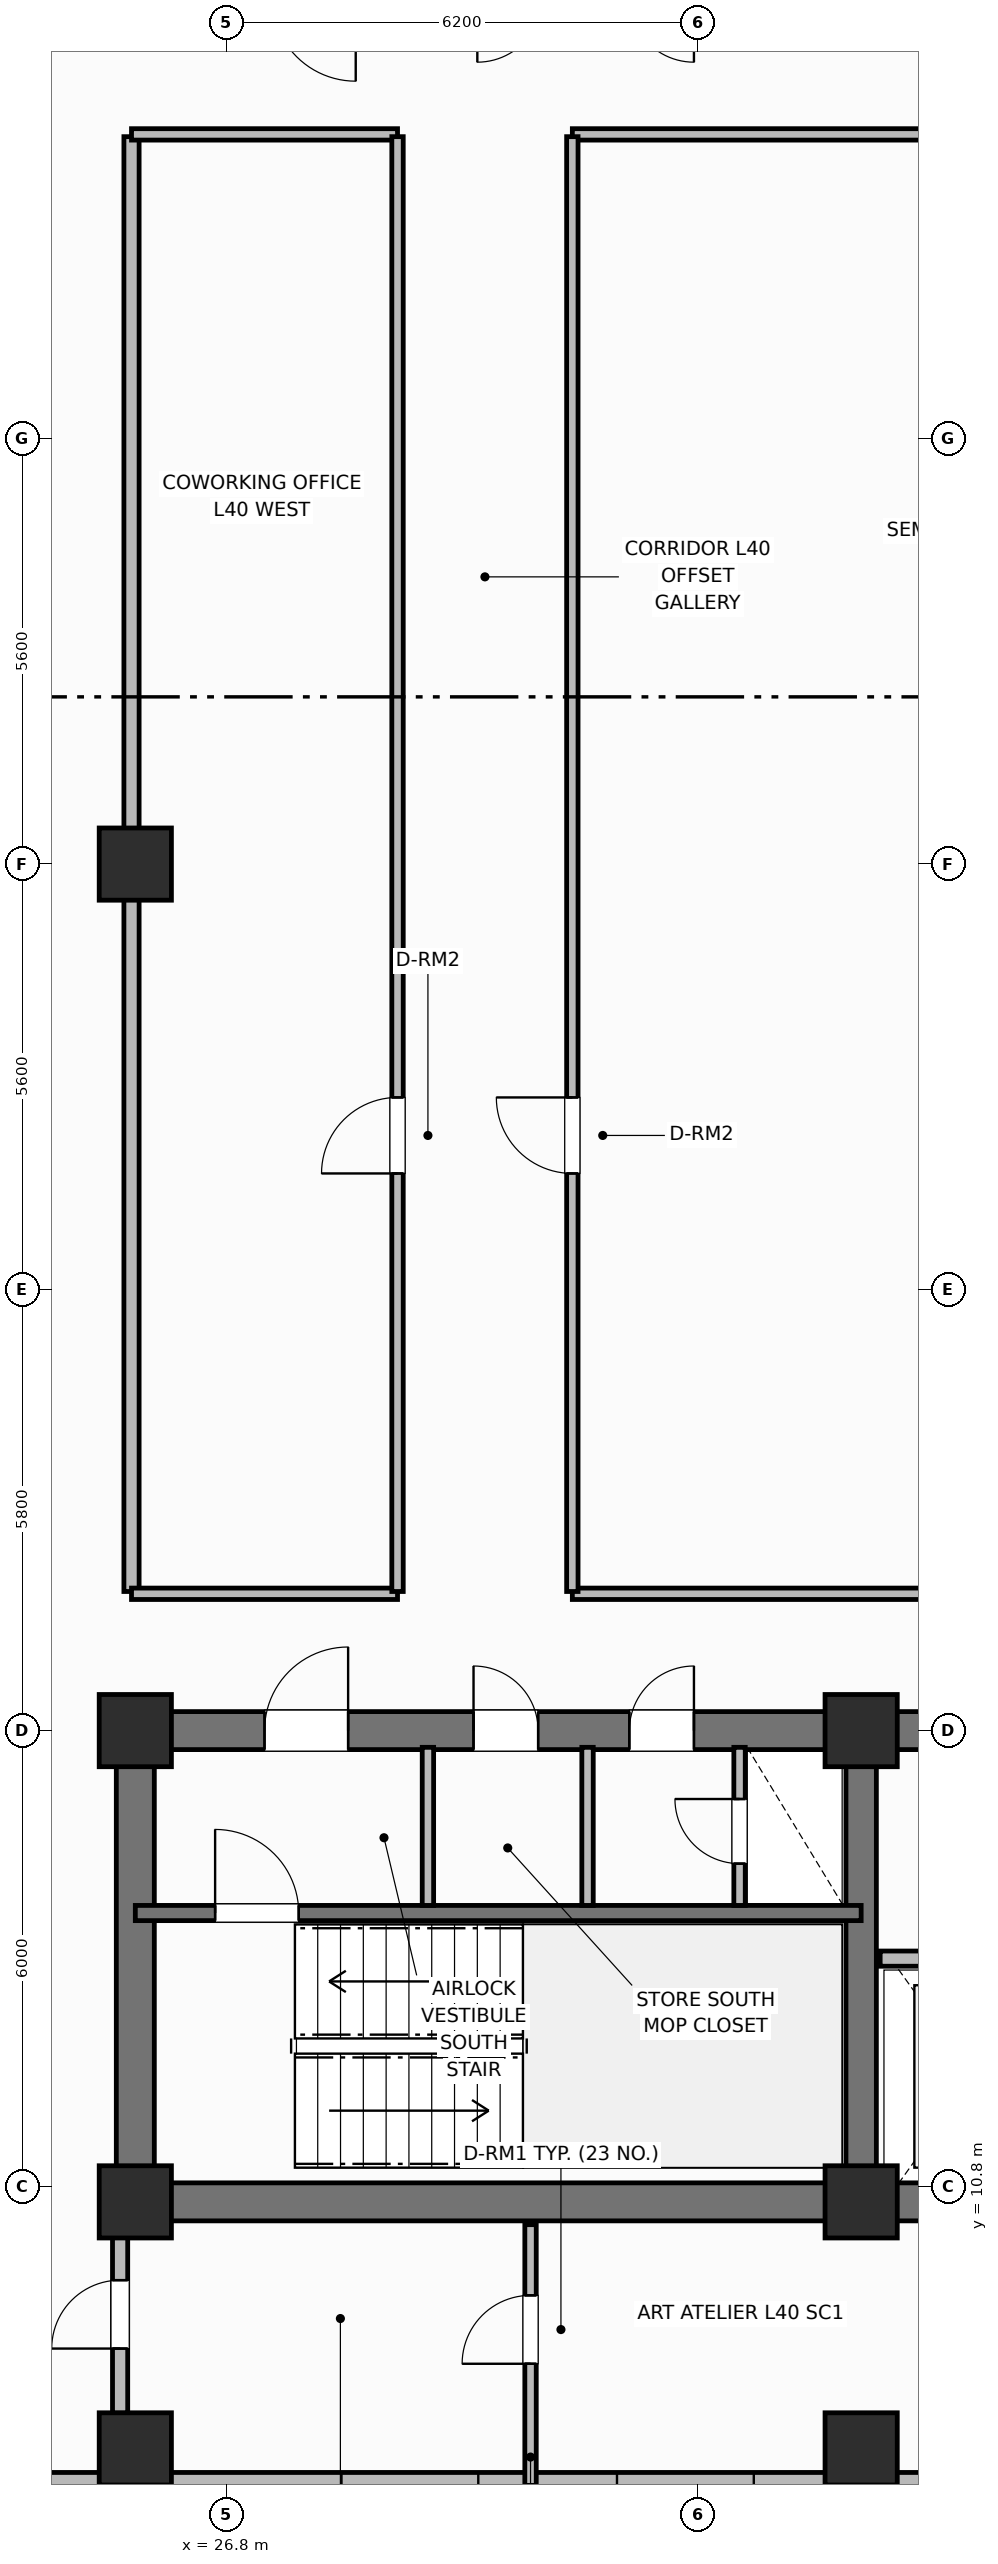
"""IFC4 building model, lengths in metres.
Left out: names, types, materials, properties, quantities, classifications, styles, units other than length and angle.
Written with IfcOpenShell. Run it as: python <this file> out.ifc"""

import sys

from ifc_helpers import new_model, si_unit, direction, frame, frame_2d, origin, origin_2d, place, context, subcontext, project, spatial, rectangle, extrude, element, fill, save


model = new_model("IFC4")
c1 = context("Model", 3, precision=1e-05, world=origin(), true_north=direction((0.0, 1.0)))
c2 = subcontext(c1, "Body", "Model", "MODEL_VIEW")
j1 = project(units=[si_unit("LENGTHUNIT", "METRE"), si_unit("PLANEANGLEUNIT", "RADIAN")], contexts=[c1])
p1 = place(None, origin())
s1 = spatial("IfcSite", under=j1, at=p1, CompositionType="ELEMENT")
p2 = place(p1, origin())
s2 = spatial("IfcBuilding", under=s1, at=p2, CompositionType="ELEMENT")
p3 = place(p2, frame((0.0, 0.0, 162.6)))
s3 = spatial("IfcBuildingStorey", under=s2, at=p3, CompositionType="ELEMENT", Elevation=162.6)
p4 = place(p3, frame((52.8, 10.6, 0.0), z_axis=(0.0, 0.0, 1.0), x_axis=(-1.0, 0.0, 0.0)))
e1 = element("IfcWall", 1, at=p4, inside=s3, PredefinedType="SHEAR", context=c2, shape_type="SweptSolid", body=[
    extrude(rectangle(XDim=27.2, YDim=0.5, at=frame_2d((13.6, 0.0))), origin(), (0.0, 0.0, 1.0), 3.7),
])
p5 = place(p3, frame((25.6, 10.85, 0.0), z_axis=(0.0, 0.0, 1.0), x_axis=(0.0, 1.0, 0.0)))
e2 = element("IfcWall", 2, at=p5, inside=s3, PredefinedType="SHEAR", context=c2, shape_type="SweptSolid", body=[
    extrude(rectangle(XDim=5.7, YDim=0.5, at=frame_2d((2.85, 0.0))), origin(), (0.0, 0.0, 1.0), 3.7),
])
p6 = place(p3, frame((25.6, 16.8, 0.0), z_axis=(0.0, 0.0, 1.0), x_axis=(1.0, 0.0, 0.0)))
e3 = element("IfcWall", 3, at=p6, inside=s3, PredefinedType="SHEAR", context=c2, shape_type="SweptSolid", body=[
    extrude(rectangle(XDim=27.2, YDim=0.5, at=frame_2d((13.6, 0.0))), origin(), (0.0, 0.0, 1.0), 3.7),
])
p7 = place(p6, frame((1.7, 0.0, 0.0)))
e4 = element("IfcOpeningElement", 4, at=p7, cuts=e3, PredefinedType="OPENING", context=c2, shape_type="SweptSolid", body=[
    extrude(rectangle(XDim=1.1, YDim=2.15, at=frame_2d((0.55, 1.075))), frame((0.0, 0.26, 0.0), z_axis=(0.0, -1.0, 0.0), x_axis=(1.0, 0.0, 0.0)), (0.0, 0.0, 1.0), 0.52),
])
p8 = place(p6, frame((4.45, 0.0, 0.0)))
e5 = element("IfcOpeningElement", 5, at=p8, cuts=e3, PredefinedType="OPENING", context=c2, shape_type="SweptSolid", body=[
    extrude(rectangle(XDim=0.85, YDim=2.1, at=frame_2d((0.425, 1.05))), frame((0.0, 0.26, 0.0), z_axis=(0.0, -1.0, 0.0), x_axis=(1.0, 0.0, 0.0)), (0.0, 0.0, 1.0), 0.52),
])
p9 = place(p6, frame((6.5, 0.0, 0.0)))
e6 = element("IfcOpeningElement", 6, at=p9, cuts=e3, PredefinedType="OPENING", context=c2, shape_type="SweptSolid", body=[
    extrude(rectangle(XDim=0.85, YDim=2.1, at=frame_2d((0.425, 1.05))), frame((0.0, 0.26, 0.0), z_axis=(0.0, -1.0, 0.0), x_axis=(1.0, 0.0, 0.0)), (0.0, 0.0, 1.0), 0.52),
])
p10 = place(p6, frame((13.0, 0.0, 0.0)))
e7 = element("IfcOpeningElement", 7, at=p10, cuts=e3, PredefinedType="OPENING", context=c2, shape_type="SweptSolid", body=[
    extrude(rectangle(XDim=1.2, YDim=2.15, at=frame_2d((0.6, 1.075))), frame((0.0, 0.26, 0.0), z_axis=(0.0, -1.0, 0.0), x_axis=(1.0, 0.0, 0.0)), (0.0, 0.0, 1.0), 0.52),
])
p11 = place(p6, frame((19.8, 0.0, 0.0)))
e8 = element("IfcOpeningElement", 8, at=p11, cuts=e3, PredefinedType="OPENING", context=c2, shape_type="SweptSolid", body=[
    extrude(rectangle(XDim=0.85, YDim=2.1, at=frame_2d((0.425, 1.05))), frame((0.0, 0.26, 0.0), z_axis=(0.0, -1.0, 0.0), x_axis=(1.0, 0.0, 0.0)), (0.0, 0.0, 1.0), 0.52),
])
p12 = place(p6, frame((24.2, 0.0, 0.0)))
e9 = element("IfcOpeningElement", 9, at=p12, cuts=e3, PredefinedType="OPENING", context=c2, shape_type="SweptSolid", body=[
    extrude(rectangle(XDim=0.85, YDim=2.1, at=frame_2d((0.425, 1.05))), frame((0.0, 0.26, 0.0), z_axis=(0.0, -1.0, 0.0), x_axis=(1.0, 0.0, 0.0)), (0.0, 0.0, 1.0), 0.52),
])
p13 = place(p3, frame((35.15, 10.85, 0.0), z_axis=(0.0, 0.0, 1.0), x_axis=(0.0, 1.0, 0.0)))
e10 = element("IfcWall", 10, at=p13, inside=s3, PredefinedType="SHEAR", context=c2, shape_type="SweptSolid", body=[
    extrude(rectangle(XDim=5.7, YDim=0.4, at=frame_2d((2.85, 0.0))), origin(), (0.0, 0.0, 1.0), 3.7),
])
for number, where, z_axis, x_axis in (
    (11, (25.6, 10.6, 0.0), (0.0, 0.0, 1.0), (1.0, 0.0, 0.0)),
    (12, (25.6, 16.8, 0.0), (0.0, 0.0, 1.0), (1.0, 0.0, 0.0)),
    (13, (35.15, 10.6, 0.0), (0.0, 0.0, 1.0), (1.0, 0.0, 0.0)),
    (14, (35.15, 16.8, 0.0), (0.0, 0.0, 1.0), (1.0, 0.0, 0.0)),
    (15, (25.6, 28.2, 0.0), (0.0, 0.0, 1.0), (1.0, 0.0, 0.0)),
    (16, (25.6, 7.35, 0.0), (0.0, 0.0, 1.0), (1.0, 0.0, 0.0)),
    (17, (35.15, 7.35, 0.0), (0.0, 0.0, 1.0), (1.0, 0.0, 0.0)),
):
    element("IfcColumn", number, at=place(p3, frame(where, z_axis=z_axis, x_axis=x_axis)), inside=s3, PredefinedType="COLUMN", context=c2, shape_type="SweptSolid", body=[
        extrude(rectangle(XDim=0.95, YDim=0.95, at=origin_2d()), origin(), (0.0, 0.0, 1.0), 3.7),
    ])
p14 = place(p3, frame((20.2, 6.87, 0.0), z_axis=(0.0, 0.0, 1.0), x_axis=(1.0, 0.0, 0.0)))
e18 = element("IfcWall", 18, at=p14, inside=s3, PredefinedType="SOLIDWALL", context=c2, shape_type="SweptSolid", body=[
    extrude(rectangle(XDim=15.8, YDim=0.34, at=frame_2d((7.9, 0.0))), origin(), (0.0, 0.0, 1.0), 2.72),
])
p15 = place(p14, frame((0.863, 0.0, 0.75)))
e19 = element("IfcOpeningElement", 19, at=p15, cuts=e18, PredefinedType="OPENING", context=c2, shape_type="SweptSolid", body=[
    extrude(rectangle(XDim=1.8, YDim=1.85, at=frame_2d((0.9, 0.925))), frame((0.0, 0.18, 0.0), z_axis=(0.0, -1.0, 0.0), x_axis=(1.0, 0.0, 0.0)), (0.0, 0.0, 1.0), 0.36),
])
p16 = place(p14, frame((8.113, 0.0, 0.75)))
e20 = element("IfcOpeningElement", 20, at=p16, cuts=e18, PredefinedType="OPENING", context=c2, shape_type="SweptSolid", body=[
    extrude(rectangle(XDim=1.8, YDim=1.85, at=frame_2d((0.9, 0.925))), frame((0.0, 0.18, 0.0), z_axis=(0.0, -1.0, 0.0), x_axis=(1.0, 0.0, 0.0)), (0.0, 0.0, 1.0), 0.36),
])
p17 = place(p14, frame((11.738, 0.0, 0.75)))
e21 = element("IfcOpeningElement", 21, at=p17, cuts=e18, PredefinedType="OPENING", context=c2, shape_type="SweptSolid", body=[
    extrude(rectangle(XDim=1.8, YDim=1.85, at=frame_2d((0.9, 0.925))), frame((0.0, 0.18, 0.0), z_axis=(0.0, -1.0, 0.0), x_axis=(1.0, 0.0, 0.0)), (0.0, 0.0, 1.0), 0.36),
])
p18 = place(p3, frame((25.6, 14.4, 0.0), z_axis=(0.0, 0.0, 1.0), x_axis=(1.0, 0.0, 0.0)))
e22 = element("IfcWall", 22, at=p18, inside=s3, PredefinedType="SHEAR", context=c2, shape_type="SweptSolid", body=[
    extrude(rectangle(XDim=9.55, YDim=0.2, at=frame_2d((4.775, 0.0))), origin(), (0.0, 0.0, 1.0), 3.7),
])
p19 = place(p18, frame((1.05, 0.0, 0.0)))
e23 = element("IfcOpeningElement", 23, at=p19, cuts=e22, PredefinedType="OPENING", context=c2, shape_type="SweptSolid", body=[
    extrude(rectangle(XDim=1.1, YDim=2.15, at=frame_2d((0.55, 1.075))), frame((0.0, 0.11, 0.0), z_axis=(0.0, -1.0, 0.0), x_axis=(1.0, 0.0, 0.0)), (0.0, 0.0, 1.0), 0.22),
])
for number, where, z_axis, x_axis in (
    (24, (29.45, 14.5, 0.0), (0.0, 0.0, 1.0), (0.0, 1.0, 0.0)),
    (25, (31.55, 14.5, 0.0), (0.0, 0.0, 1.0), (0.0, 1.0, 0.0)),
):
    element("IfcWall", number, at=place(p3, frame(where, z_axis=z_axis, x_axis=x_axis)), inside=s3, PredefinedType="PARTITIONING", context=c2, shape_type="SweptSolid", body=[
        extrude(rectangle(XDim=2.08, YDim=0.15, at=frame_2d((1.04, 0.0))), origin(), (0.0, 0.0, 1.0), 2.55),
    ])
p20 = place(p3, frame((33.55, 14.5, 0.0), z_axis=(0.0, 0.0, 1.0), x_axis=(0.0, 1.0, 0.0)))
e26 = element("IfcWall", 26, at=p20, inside=s3, PredefinedType="PARTITIONING", context=c2, shape_type="SweptSolid", body=[
    extrude(rectangle(XDim=2.08, YDim=0.15, at=frame_2d((1.04, 0.0))), origin(), (0.0, 0.0, 1.0), 2.55),
])
p21 = place(p20, frame((0.55, 0.0, 0.0)))
e27 = element("IfcOpeningElement", 27, at=p21, cuts=e26, PredefinedType="OPENING", context=c2, shape_type="SweptSolid", body=[
    extrude(rectangle(XDim=0.85, YDim=2.05, at=frame_2d((0.425, 1.025))), frame((0.0, 0.085, 0.0), z_axis=(0.0, -1.0, 0.0), x_axis=(1.0, 0.0, 0.0)), (0.0, 0.0, 1.0), 0.17),
])
p22 = place(p3, frame((35.4, 13.8, 0.0), z_axis=(0.0, 0.0, 1.0), x_axis=(1.0, 0.0, 0.0)))
e28 = element("IfcWall", 28, at=p22, inside=s3, PredefinedType="PARTITIONING", context=c2, shape_type="SweptSolid", body=[
    extrude(rectangle(XDim=7.6, YDim=0.2, at=frame_2d((3.8, 0.0))), origin(), (0.0, 0.0, 1.0), 2.32),
])
p23 = place(p22, frame((0.7, 0.0, 0.0)))
e29 = element("IfcOpeningElement", 29, at=p23, cuts=e28, PredefinedType="OPENING", context=c2, shape_type="SweptSolid", body=[
    extrude(rectangle(XDim=1.1, YDim=2.15, at=frame_2d((0.55, 1.075))), frame((0.0, 0.11, 0.0), z_axis=(0.0, -1.0, 0.0), x_axis=(1.0, 0.0, 0.0)), (0.0, 0.0, 1.0), 0.22),
])
p24 = place(p22, frame((3.35, 0.0, 0.0)))
e30 = element("IfcOpeningElement", 30, at=p24, cuts=e28, PredefinedType="OPENING", context=c2, shape_type="SweptSolid", body=[
    extrude(rectangle(XDim=1.2, YDim=2.15, at=frame_2d((0.6, 1.075))), frame((0.0, 0.11, 0.0), z_axis=(0.0, -1.0, 0.0), x_axis=(1.0, 0.0, 0.0)), (0.0, 0.0, 1.0), 0.22),
])
p25 = place(p3, frame((25.55, 18.63, 0.0), z_axis=(0.0, 0.0, 1.0), x_axis=(0.0, 1.0, 0.0)))
e31 = element("IfcWall", 31, at=p25, inside=s3, PredefinedType="PARTITIONING", context=c2, shape_type="SweptSolid", body=[
    extrude(rectangle(XDim=19.14, YDim=0.2, at=frame_2d((9.57, 0.0))), origin(), (0.0, 0.0, 1.0), 2.55),
])
p26 = place(p3, frame((25.55, 18.6, 0.0), z_axis=(0.0, 0.0, 1.0), x_axis=(1.0, 0.0, 0.0)))
e32 = element("IfcWall", 32, at=p26, inside=s3, PredefinedType="PARTITIONING", context=c2, shape_type="SweptSolid", body=[
    extrude(rectangle(XDim=3.5, YDim=0.15, at=frame_2d((1.75, 0.0))), origin(), (0.0, 0.0, 1.0), 2.55),
])
p27 = place(p3, frame((31.35, 18.6, 0.0), z_axis=(0.0, 0.0, 1.0), x_axis=(1.0, 0.0, 0.0)))
e33 = element("IfcWall", 33, at=p27, inside=s3, PredefinedType="PARTITIONING", context=c2, shape_type="SweptSolid", body=[
    extrude(rectangle(XDim=21.5, YDim=0.15, at=frame_2d((10.75, 0.0))), origin(), (0.0, 0.0, 1.0), 2.55),
])
p28 = place(p3, frame((25.55, 37.8, 0.0), z_axis=(0.0, 0.0, 1.0), x_axis=(1.0, 0.0, 0.0)))
e34 = element("IfcWall", 34, at=p28, inside=s3, PredefinedType="PARTITIONING", context=c2, shape_type="SweptSolid", body=[
    extrude(rectangle(XDim=3.5, YDim=0.15, at=frame_2d((1.75, 0.0))), origin(), (0.0, 0.0, 1.0), 2.55),
])
p29 = place(p3, frame((31.35, 37.8, 0.0), z_axis=(0.0, 0.0, 1.0), x_axis=(1.0, 0.0, 0.0)))
e35 = element("IfcWall", 35, at=p29, inside=s3, PredefinedType="PARTITIONING", context=c2, shape_type="SweptSolid", body=[
    extrude(rectangle(XDim=21.5, YDim=0.15, at=frame_2d((10.75, 0.0))), origin(), (0.0, 0.0, 1.0), 2.55),
])
p30 = place(p3, frame((29.05, 18.63, 0.0), z_axis=(0.0, 0.0, 1.0), x_axis=(0.0, 1.0, 0.0)))
e36 = element("IfcWall", 36, at=p30, inside=s3, PredefinedType="PARTITIONING", context=c2, shape_type="SweptSolid", body=[
    extrude(rectangle(XDim=19.14, YDim=0.15, at=frame_2d((9.57, 0.0))), origin(), (0.0, 0.0, 1.0), 2.55),
])
p31 = place(p30, frame((5.5, 0.0, 0.0)))
e37 = element("IfcOpeningElement", 37, at=p31, cuts=e36, PredefinedType="OPENING", context=c2, shape_type="SweptSolid", body=[
    extrude(rectangle(XDim=1.0, YDim=2.15, at=frame_2d((0.5, 1.075))), frame((0.0, 0.085, 0.0), z_axis=(0.0, -1.0, 0.0), x_axis=(1.0, 0.0, 0.0)), (0.0, 0.0, 1.0), 0.17),
])
p32 = place(p3, frame((31.35, 18.63, 0.0), z_axis=(0.0, 0.0, 1.0), x_axis=(0.0, 1.0, 0.0)))
e38 = element("IfcWall", 38, at=p32, inside=s3, PredefinedType="PARTITIONING", context=c2, shape_type="SweptSolid", body=[
    extrude(rectangle(XDim=19.14, YDim=0.15, at=frame_2d((9.57, 0.0))), origin(), (0.0, 0.0, 1.0), 2.55),
])
p33 = place(p32, frame((5.5, 0.0, 0.0)))
e39 = element("IfcOpeningElement", 39, at=p33, cuts=e38, PredefinedType="OPENING", context=c2, shape_type="SweptSolid", body=[
    extrude(rectangle(XDim=1.0, YDim=2.15, at=frame_2d((0.5, 1.075))), frame((0.0, 0.085, 0.0), z_axis=(0.0, -1.0, 0.0), x_axis=(1.0, 0.0, 0.0)), (0.0, 0.0, 1.0), 0.17),
])
p34 = place(p3, frame((30.8, 6.87, 0.0), z_axis=(0.0, 0.0, 1.0), x_axis=(0.0, 1.0, 0.0)))
e40 = element("IfcWall", 40, at=p34, inside=s3, PredefinedType="PARTITIONING", context=c2, shape_type="SweptSolid", body=[
    extrude(rectangle(XDim=3.43, YDim=0.15, at=frame_2d((1.715, 0.0))), origin(), (0.0, 0.0, 1.0), 2.55),
])
p35 = place(p34, frame((1.6, 0.0, 0.0)))
e41 = element("IfcOpeningElement", 41, at=p35, cuts=e40, PredefinedType="OPENING", context=c2, shape_type="SweptSolid", body=[
    extrude(rectangle(XDim=0.9, YDim=2.1, at=frame_2d((0.45, 1.05))), frame((0.0, 0.085, 0.0), z_axis=(0.0, -1.0, 0.0), x_axis=(1.0, 0.0, 0.0)), (0.0, 0.0, 1.0), 0.17),
])
p36 = place(p3, frame((25.4, 7.82, 0.0), z_axis=(0.0, 0.0, 1.0), x_axis=(0.0, 1.0, 0.0)))
e42 = element("IfcWall", 42, at=p36, inside=s3, PredefinedType="PARTITIONING", context=c2, shape_type="SweptSolid", body=[
    extrude(rectangle(XDim=2.48, YDim=0.2, at=frame_2d((1.24, 0.0))), origin(), (0.0, 0.0, 1.0), 2.55),
])
p37 = place(p36, frame((0.85, 0.0, 0.0)))
e43 = element("IfcOpeningElement", 43, at=p37, cuts=e42, PredefinedType="OPENING", context=c2, shape_type="SweptSolid", body=[
    extrude(rectangle(XDim=0.9, YDim=2.1, at=frame_2d((0.45, 1.05))), frame((0.0, 0.11, 0.0), z_axis=(0.0, -1.0, 0.0), x_axis=(1.0, 0.0, 0.0)), (0.0, 0.0, 1.0), 0.22),
])
p38 = place(p16, origin())
e44 = element("IfcWindow", 44, at=p38, inside=s3, PartitioningType="SINGLE_PANEL", PredefinedType="WINDOW", context=c2, shape_type="SweptSolid", body=[
    extrude(rectangle(XDim=1.8, YDim=1.85, at=frame_2d((0.9, 0.925))), frame((0.0, 0.03, 0.0), z_axis=(0.0, -1.0, 0.0), x_axis=(1.0, 0.0, 0.0)), (0.0, 0.0, 1.0), 0.06),
])
fill(e20, e44)
p39 = place(p17, origin())
e45 = element("IfcWindow", 45, at=p39, inside=s3, PartitioningType="SINGLE_PANEL", PredefinedType="WINDOW", context=c2, shape_type="SweptSolid", body=[
    extrude(rectangle(XDim=1.8, YDim=1.85, at=frame_2d((0.9, 0.925))), frame((0.0, 0.03, 0.0), z_axis=(0.0, -1.0, 0.0), x_axis=(1.0, 0.0, 0.0)), (0.0, 0.0, 1.0), 0.06),
])
fill(e21, e45)
p40 = place(p19, origin())
e46 = element("IfcDoor", 46, at=p40, inside=s3, OperationType="SINGLE_SWING_LEFT", PredefinedType="DOOR", context=c2, shape_type="SweptSolid", body=[
    extrude(rectangle(XDim=1.1, YDim=2.15, at=frame_2d((0.55, 1.075))), frame((0.0, 0.025, 0.0), z_axis=(0.0, -1.0, 0.0), x_axis=(1.0, 0.0, 0.0)), (0.0, 0.0, 1.0), 0.05),
])
fill(e23, e46)
p41 = place(p21, origin())
e47 = element("IfcDoor", 47, at=p41, inside=s3, OperationType="SINGLE_SWING_RIGHT", PredefinedType="TRAPDOOR", context=c2, shape_type="SweptSolid", body=[
    extrude(rectangle(XDim=0.85, YDim=2.05, at=frame_2d((0.425, 1.025))), frame((0.0, 0.025, 0.0), z_axis=(0.0, -1.0, 0.0), x_axis=(1.0, 0.0, 0.0)), (0.0, 0.0, 1.0), 0.05),
])
fill(e27, e47)
p42 = place(p31, origin())
e48 = element("IfcDoor", 48, at=p42, inside=s3, OperationType="SINGLE_SWING_LEFT", PredefinedType="DOOR", context=c2, shape_type="SweptSolid", body=[
    extrude(rectangle(XDim=1.0, YDim=2.15, at=frame_2d((0.5, 1.075))), frame((0.0, 0.025, 0.0), z_axis=(0.0, -1.0, 0.0), x_axis=(1.0, 0.0, 0.0)), (0.0, 0.0, 1.0), 0.05),
])
fill(e37, e48)
p43 = place(p33, origin())
e49 = element("IfcDoor", 49, at=p43, inside=s3, OperationType="SINGLE_SWING_RIGHT", PredefinedType="DOOR", context=c2, shape_type="SweptSolid", body=[
    extrude(rectangle(XDim=1.0, YDim=2.15, at=frame_2d((0.5, 1.075))), frame((0.0, 0.025, 0.0), z_axis=(0.0, -1.0, 0.0), x_axis=(1.0, 0.0, 0.0)), (0.0, 0.0, 1.0), 0.05),
])
fill(e39, e49)
p44 = place(p35, origin())
e50 = element("IfcDoor", 50, at=p44, inside=s3, OperationType="SINGLE_SWING_LEFT", PredefinedType="DOOR", context=c2, shape_type="SweptSolid", body=[
    extrude(rectangle(XDim=0.9, YDim=2.1, at=frame_2d((0.45, 1.05))), frame((0.0, 0.025, 0.0), z_axis=(0.0, -1.0, 0.0), x_axis=(1.0, 0.0, 0.0)), (0.0, 0.0, 1.0), 0.05),
])
fill(e41, e50)
p45 = place(p37, origin())
e51 = element("IfcDoor", 51, at=p45, inside=s3, OperationType="SINGLE_SWING_LEFT", PredefinedType="DOOR", context=c2, shape_type="SweptSolid", body=[
    extrude(rectangle(XDim=0.9, YDim=2.1, at=frame_2d((0.45, 1.05))), frame((0.0, 0.025, 0.0), z_axis=(0.0, -1.0, 0.0), x_axis=(1.0, 0.0, 0.0)), (0.0, 0.0, 1.0), 0.05),
])
fill(e43, e51)
p46 = place(p7, origin())
e52 = element("IfcDoor", 52, at=p46, inside=s3, OperationType="SINGLE_SWING_RIGHT", PredefinedType="DOOR", context=c2, shape_type="SweptSolid", body=[
    extrude(rectangle(XDim=1.1, YDim=2.15, at=frame_2d((0.55, 1.075))), frame((0.0, 0.025, 0.0), z_axis=(0.0, -1.0, 0.0), x_axis=(1.0, 0.0, 0.0)), (0.0, 0.0, 1.0), 0.05),
])
fill(e4, e52)
p47 = place(p8, origin())
e53 = element("IfcDoor", 53, at=p47, inside=s3, OperationType="SINGLE_SWING_LEFT", PredefinedType="DOOR", context=c2, shape_type="SweptSolid", body=[
    extrude(rectangle(XDim=0.85, YDim=2.1, at=frame_2d((0.425, 1.05))), frame((0.0, 0.025, 0.0), z_axis=(0.0, -1.0, 0.0), x_axis=(1.0, 0.0, 0.0)), (0.0, 0.0, 1.0), 0.05),
])
fill(e5, e53)
p48 = place(p9, origin())
e54 = element("IfcDoor", 54, at=p48, inside=s3, OperationType="SINGLE_SWING_RIGHT", PredefinedType="DOOR", context=c2, shape_type="SweptSolid", body=[
    extrude(rectangle(XDim=0.85, YDim=2.1, at=frame_2d((0.425, 1.05))), frame((0.0, 0.025, 0.0), z_axis=(0.0, -1.0, 0.0), x_axis=(1.0, 0.0, 0.0)), (0.0, 0.0, 1.0), 0.05),
])
fill(e6, e54)
save(model, sys.argv[1])
